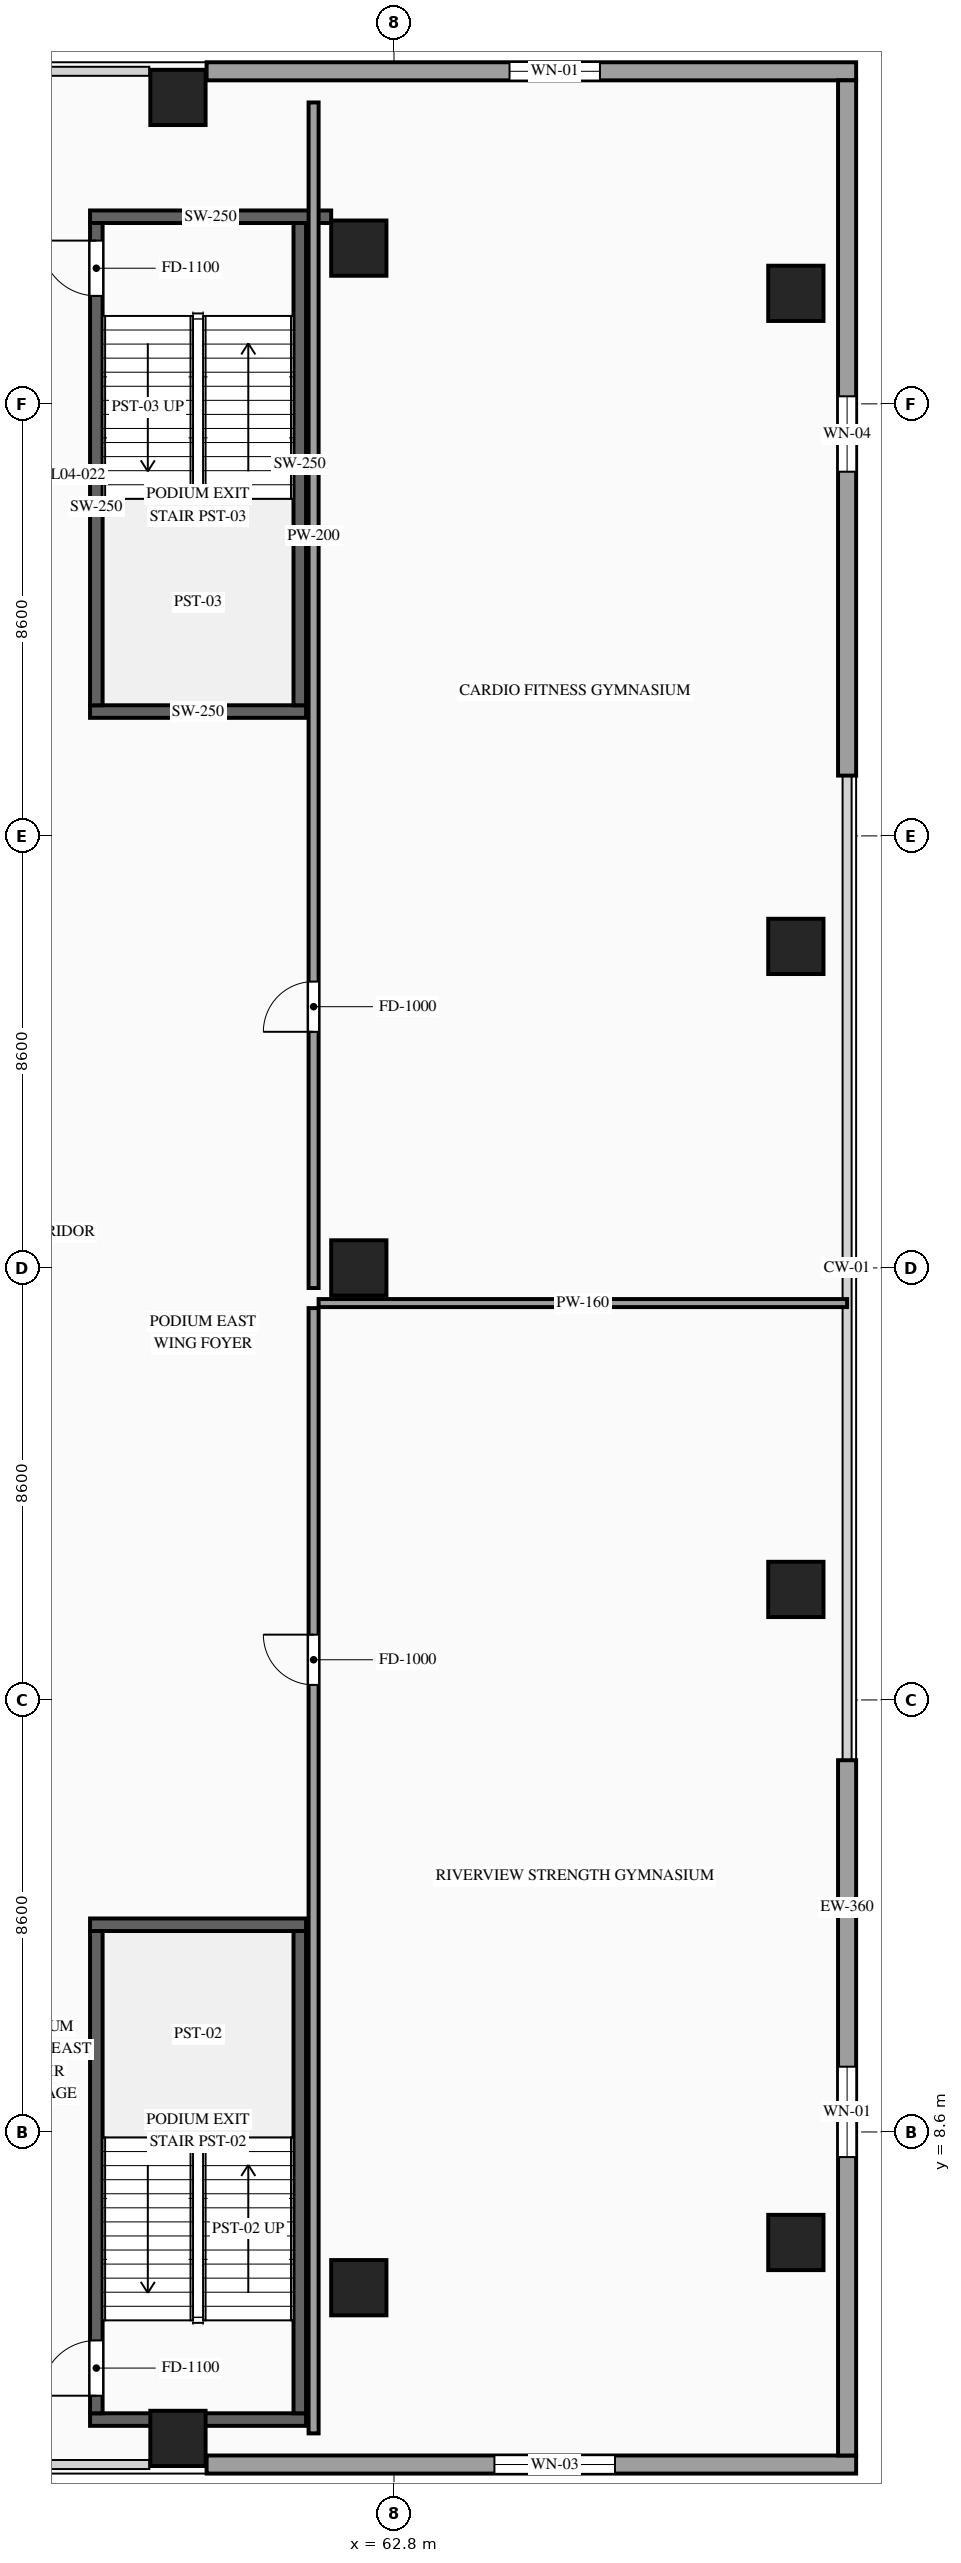
"""IFC4 building model, lengths in metres.
Left out: names, types, materials, properties, quantities, classifications, styles, units other than length and angle.
Written with IfcOpenShell. Run it as: python <this file> out.ifc"""

import sys

from ifc_helpers import new_model, si_unit, direction, frame, frame_2d, origin, origin_2d, place, context, subcontext, project, spatial, rectangle, extrude, source, transform, mapped, element, fill, save


model = new_model("IFC4")
c1 = context("Model", 3, precision=1e-05, world=origin(), true_north=direction((0.0, 1.0)))
c2 = subcontext(c1, "Body", "Model", "MODEL_VIEW")
j1 = project(units=[si_unit("LENGTHUNIT", "METRE"), si_unit("PLANEANGLEUNIT", "RADIAN")], contexts=[c1])
p1 = place(None, origin())
s1 = spatial("IfcSite", under=j1, at=p1, CompositionType="ELEMENT")
p2 = place(p1, origin())
s2 = spatial("IfcBuilding", under=s1, at=p2, CompositionType="ELEMENT")
p3 = place(p2, frame((0.0, 0.0, 15.0)))
s3 = spatial("IfcBuildingStorey", under=s2, at=p3, CompositionType="ELEMENT", Elevation=15.0)
m1 = source(origin(), c2, "Body", "SweptSolid", [
    extrude(rectangle(XDim=1.1, YDim=1.1, at=origin_2d()), origin(), (0.0, 0.0, 1.0), 4.8),
])
for number, where, z_axis, x_axis in (
    (1, (70.8, 6.4, 0.0), (0.0, 0.0, 1.0), (1.0, 0.0, 0.0)),
    (2, (70.8, 19.4, 0.0), (0.0, 0.0, 1.0), (1.0, 0.0, 0.0)),
    (3, (70.8, 32.2, 0.0), (0.0, 0.0, 1.0), (1.0, 0.0, 0.0)),
    (4, (70.8, 45.2, 0.0), (0.0, 0.0, 1.0), (1.0, 0.0, 0.0)),
    (5, (62.1, 5.5, 0.0), (0.0, 0.0, 1.0), (1.0, 0.0, 0.0)),
    (6, (62.1, 25.8, 0.0), (0.0, 0.0, 1.0), (1.0, 0.0, 0.0)),
    (7, (62.1, 46.1, 0.0), (0.0, 0.0, 1.0), (1.0, 0.0, 0.0)),
    (8, (58.5, 2.5, 0.0), (0.0, 0.0, 1.0), (1.0, 0.0, 0.0)),
    (9, (58.5, 49.1, 0.0), (0.0, 0.0, 1.0), (1.0, 0.0, 0.0)),
):
    element("IfcColumn", number, at=place(p3, frame(where, z_axis=z_axis, x_axis=x_axis)), inside=s3, PredefinedType="COLUMN", context=c2, shape_type="MappedRepresentation", body=[
        mapped(m1, transform((0.0, 0.0, 0.0), scale=1.0)),
    ])
p4 = place(p3, frame((59.07, 1.98, 0.0), z_axis=(0.0, 0.0, 1.0), x_axis=(1.0, 0.0, 0.0)))
e10 = element("IfcWall", 10, at=p4, inside=s3, PredefinedType="SOLIDWALL", context=c2, shape_type="SweptSolid", body=[
    extrude(rectangle(XDim=12.93, YDim=0.36, at=frame_2d((6.465, 0.0))), origin(), (0.0, 0.0, 1.0), 4.52),
])
p5 = place(p4, frame((5.73, 0.0, 0.85)))
e11 = element("IfcOpeningElement", 11, at=p5, cuts=e10, PredefinedType="OPENING", context=c2, shape_type="SweptSolid", body=[
    extrude(rectangle(XDim=2.4, YDim=2.4, at=frame_2d((1.2, 1.2))), frame((0.0, 0.195, 0.0), z_axis=(0.0, -1.0, 0.0), x_axis=(1.0, 0.0, 0.0)), (0.0, 0.0, 1.0), 0.39),
])
p6 = place(p3, frame((59.07, 49.62, 0.0), z_axis=(0.0, 0.0, 1.0), x_axis=(1.0, 0.0, 0.0)))
e12 = element("IfcWall", 12, at=p6, inside=s3, PredefinedType="SOLIDWALL", context=c2, shape_type="SweptSolid", body=[
    extrude(rectangle(XDim=12.93, YDim=0.36, at=frame_2d((6.465, 0.0))), origin(), (0.0, 0.0, 1.0), 4.52),
])
p7 = place(p6, frame((6.03, 0.0, 0.9)))
e13 = element("IfcOpeningElement", 13, at=p7, cuts=e12, PredefinedType="OPENING", context=c2, shape_type="SweptSolid", body=[
    extrude(rectangle(XDim=1.8, YDim=2.2, at=frame_2d((0.9, 1.1))), frame((0.0, 0.195, 0.0), z_axis=(0.0, -1.0, 0.0), x_axis=(1.0, 0.0, 0.0)), (0.0, 0.0, 1.0), 0.39),
])
p8 = place(p3, frame((71.82, 2.16, 0.0), z_axis=(0.0, 0.0, 1.0), x_axis=(0.0, 1.0, 0.0)))
e14 = element("IfcWall", 14, at=p8, inside=s3, PredefinedType="SOLIDWALL", context=c2, shape_type="SweptSolid", body=[
    extrude(rectangle(XDim=13.84, YDim=0.36, at=frame_2d((6.92, 0.0))), origin(), (0.0, 0.0, 1.0), 4.52),
])
p9 = place(p8, frame((5.94, 0.0, 0.9)))
e15 = element("IfcOpeningElement", 15, at=p9, cuts=e14, PredefinedType="OPENING", context=c2, shape_type="SweptSolid", body=[
    extrude(rectangle(XDim=1.8, YDim=2.2, at=frame_2d((0.9, 1.1))), frame((0.0, 0.195, 0.0), z_axis=(0.0, -1.0, 0.0), x_axis=(1.0, 0.0, 0.0)), (0.0, 0.0, 1.0), 0.39),
])
p10 = place(p3, frame((71.82, 35.6, 0.0), z_axis=(0.0, 0.0, 1.0), x_axis=(0.0, 1.0, 0.0)))
e16 = element("IfcWall", 16, at=p10, inside=s3, PredefinedType="SOLIDWALL", context=c2, shape_type="SweptSolid", body=[
    extrude(rectangle(XDim=13.84, YDim=0.36, at=frame_2d((6.92, 0.0))), origin(), (0.0, 0.0, 1.0), 4.52),
])
p11 = place(p10, frame((6.05, 0.0, 0.9)))
e17 = element("IfcOpeningElement", 17, at=p11, cuts=e16, PredefinedType="OPENING", context=c2, shape_type="SweptSolid", body=[
    extrude(rectangle(XDim=1.5, YDim=1.8, at=frame_2d((0.75, 0.9))), frame((0.0, 0.195, 0.0), z_axis=(0.0, -1.0, 0.0), x_axis=(1.0, 0.0, 0.0)), (0.0, 0.0, 1.0), 0.39),
])
m2 = source(origin(), c2, "Body", "SweptSolid", [
    extrude(rectangle(XDim=4.3, YDim=0.25, at=frame_2d((2.15, 0.0))), origin(), (0.0, 0.0, 1.0), 4.52),
])
for number, where, z_axis, x_axis in (
    (18, (56.75, 2.875, 0.0), (0.0, 0.0, 1.0), (1.0, 0.0, 0.0)),
    (19, (56.75, 12.725, 0.0), (0.0, 0.0, 1.0), (1.0, 0.0, 0.0)),
):
    element("IfcWall", number, at=place(p3, frame(where, z_axis=z_axis, x_axis=x_axis)), inside=s3, PredefinedType="SOLIDWALL", context=c2, shape_type="MappedRepresentation", body=[
        mapped(m2, transform((0.0, 0.0, 0.0), scale=1.0)),
    ])
p12 = place(p3, frame((56.875, 3.0, 0.0), z_axis=(0.0, 0.0, 1.0), x_axis=(0.0, 1.0, 0.0)))
e20 = element("IfcWall", 20, at=p12, inside=s3, PredefinedType="SOLIDWALL", context=c2, shape_type="SweptSolid", body=[
    extrude(rectangle(XDim=9.6, YDim=0.25, at=frame_2d((4.8, 0.0))), origin(), (0.0, 0.0, 1.0), 4.52),
])
p13 = place(p12, frame((0.35, 0.0, 0.0)))
e21 = element("IfcOpeningElement", 21, at=p13, cuts=e20, PredefinedType="OPENING", context=c2, shape_type="SweptSolid", body=[
    extrude(rectangle(XDim=1.1, YDim=2.2, at=frame_2d((0.55, 1.1))), frame((0.0, 0.14, 0.0), z_axis=(0.0, -1.0, 0.0), x_axis=(1.0, 0.0, 0.0)), (0.0, 0.0, 1.0), 0.28),
])
m3 = source(origin(), c2, "Body", "SweptSolid", [
    extrude(rectangle(XDim=9.6, YDim=0.25, at=frame_2d((4.8, 0.0))), origin(), (0.0, 0.0, 1.0), 4.52),
])
p14 = place(p3, frame((60.925, 3.0, 0.0), z_axis=(0.0, 0.0, 1.0), x_axis=(0.0, 1.0, 0.0)))
e22 = element("IfcWall", 22, at=p14, inside=s3, PredefinedType="SOLIDWALL", context=c2, shape_type="MappedRepresentation", body=[
    mapped(m3, transform((0.0, 0.0, 0.0), scale=1.0)),
])
p15 = place(p3, frame((56.75, 36.875, 0.0), z_axis=(0.0, 0.0, 1.0), x_axis=(1.0, 0.0, 0.0)))
e23 = element("IfcWall", 23, at=p15, inside=s3, PredefinedType="SOLIDWALL", context=c2, shape_type="MappedRepresentation", body=[
    mapped(m2, transform((0.0, 0.0, 0.0), scale=1.0)),
])
m4 = source(origin(), c2, "Body", "SweptSolid", [
    extrude(rectangle(XDim=4.8, YDim=0.25, at=frame_2d((2.4, 0.0))), origin(), (0.0, 0.0, 1.0), 4.52),
])
p16 = place(p3, frame((56.75, 46.725, 0.0), z_axis=(0.0, 0.0, 1.0), x_axis=(1.0, 0.0, 0.0)))
e24 = element("IfcWall", 24, at=p16, inside=s3, PredefinedType="SOLIDWALL", context=c2, shape_type="MappedRepresentation", body=[
    mapped(m4, transform((0.0, 0.0, 0.0), scale=1.0)),
])
p17 = place(p3, frame((56.875, 37.0, 0.0), z_axis=(0.0, 0.0, 1.0), x_axis=(0.0, 1.0, 0.0)))
e25 = element("IfcWall", 25, at=p17, inside=s3, PredefinedType="SOLIDWALL", context=c2, shape_type="SweptSolid", body=[
    extrude(rectangle(XDim=9.6, YDim=0.25, at=frame_2d((4.8, 0.0))), origin(), (0.0, 0.0, 1.0), 4.52),
])
p18 = place(p17, frame((8.15, 0.0, 0.0)))
e26 = element("IfcOpeningElement", 26, at=p18, cuts=e25, PredefinedType="OPENING", context=c2, shape_type="SweptSolid", body=[
    extrude(rectangle(XDim=1.1, YDim=2.2, at=frame_2d((0.55, 1.1))), frame((0.0, 0.14, 0.0), z_axis=(0.0, -1.0, 0.0), x_axis=(1.0, 0.0, 0.0)), (0.0, 0.0, 1.0), 0.28),
])
p19 = place(p3, frame((60.925, 37.0, 0.0), z_axis=(0.0, 0.0, 1.0), x_axis=(0.0, 1.0, 0.0)))
e27 = element("IfcWall", 27, at=p19, inside=s3, PredefinedType="SOLIDWALL", context=c2, shape_type="MappedRepresentation", body=[
    mapped(m3, transform((0.0, 0.0, 0.0), scale=1.0)),
])
p20 = place(p3, frame((61.2, 2.6, 0.0), z_axis=(0.0, 0.0, 1.0), x_axis=(0.0, 1.0, 0.0)))
e28 = element("IfcWall", 28, at=p20, inside=s3, PredefinedType="PARTITIONING", context=c2, shape_type="SweptSolid", body=[
    extrude(rectangle(XDim=22.4, YDim=0.2, at=frame_2d((11.2, 0.0))), origin(), (0.0, 0.0, 1.0), 4.52),
])
p21 = place(p20, frame((14.9, 0.0, 0.0)))
e29 = element("IfcOpeningElement", 29, at=p21, cuts=e28, PredefinedType="OPENING", context=c2, shape_type="SweptSolid", body=[
    extrude(rectangle(XDim=1.0, YDim=2.2, at=frame_2d((0.5, 1.1))), frame((0.0, 0.115, 0.0), z_axis=(0.0, -1.0, 0.0), x_axis=(1.0, 0.0, 0.0)), (0.0, 0.0, 1.0), 0.23),
])
m5 = source(origin(), c2, "Body", "SweptSolid", [
    extrude(rectangle(XDim=10.52, YDim=0.16, at=frame_2d((5.26, 0.0))), origin(), (0.0, 0.0, 1.0), 4.52),
])
p22 = place(p3, frame((61.3, 25.1, 0.0), z_axis=(0.0, 0.0, 1.0), x_axis=(1.0, 0.0, 0.0)))
e30 = element("IfcWall", 30, at=p22, inside=s3, PredefinedType="PARTITIONING", context=c2, shape_type="MappedRepresentation", body=[
    mapped(m5, transform((0.0, 0.0, 0.0), scale=1.0)),
])
p23 = place(p3, frame((61.2, 25.4, 0.0), z_axis=(0.0, 0.0, 1.0), x_axis=(0.0, 1.0, 0.0)))
e31 = element("IfcWall", 31, at=p23, inside=s3, PredefinedType="PARTITIONING", context=c2, shape_type="SweptSolid", body=[
    extrude(rectangle(XDim=23.6, YDim=0.2, at=frame_2d((11.8, 0.0))), origin(), (0.0, 0.0, 1.0), 4.52),
])
p24 = place(p23, frame((5.1, 0.0, 0.0)))
e32 = element("IfcOpeningElement", 32, at=p24, cuts=e31, PredefinedType="OPENING", context=c2, shape_type="SweptSolid", body=[
    extrude(rectangle(XDim=1.0, YDim=2.2, at=frame_2d((0.5, 1.1))), frame((0.0, 0.115, 0.0), z_axis=(0.0, -1.0, 0.0), x_axis=(1.0, 0.0, 0.0)), (0.0, 0.0, 1.0), 0.23),
])
m6 = source(origin(), c2, "Body", "SweptSolid", [
    extrude(rectangle(XDim=2.4, YDim=2.4, at=frame_2d((1.2, 1.2))), frame((0.0, 0.03, 0.0), z_axis=(0.0, -1.0, 0.0), x_axis=(1.0, 0.0, 0.0)), (0.0, 0.0, 1.0), 0.06),
])
p25 = place(p5, origin())
e33 = element("IfcWindow", 33, at=p25, inside=s3, PartitioningType="SINGLE_PANEL", PredefinedType="WINDOW", context=c2, shape_type="MappedRepresentation", body=[
    mapped(m6, transform((0.0, 0.0, 0.0), scale=1.0)),
])
fill(e11, e33)
m7 = source(origin(), c2, "Body", "SweptSolid", [
    extrude(rectangle(XDim=1.8, YDim=2.2, at=frame_2d((0.9, 1.1))), frame((0.0, 0.03, 0.0), z_axis=(0.0, -1.0, 0.0), x_axis=(1.0, 0.0, 0.0)), (0.0, 0.0, 1.0), 0.06),
])
p26 = place(p7, origin())
e34 = element("IfcWindow", 34, at=p26, inside=s3, PartitioningType="SINGLE_PANEL", PredefinedType="WINDOW", context=c2, shape_type="MappedRepresentation", body=[
    mapped(m7, transform((0.0, 0.0, 0.0), scale=1.0)),
])
fill(e13, e34)
p27 = place(p9, origin())
e35 = element("IfcWindow", 35, at=p27, inside=s3, PartitioningType="SINGLE_PANEL", PredefinedType="WINDOW", context=c2, shape_type="MappedRepresentation", body=[
    mapped(m7, transform((0.0, 0.0, 0.0), scale=1.0)),
])
fill(e15, e35)
m8 = source(origin(), c2, "Body", "SweptSolid", [
    extrude(rectangle(XDim=1.5, YDim=1.8, at=frame_2d((0.75, 0.9))), frame((0.0, 0.03, 0.0), z_axis=(0.0, -1.0, 0.0), x_axis=(1.0, 0.0, 0.0)), (0.0, 0.0, 1.0), 0.06),
])
p28 = place(p11, origin())
e36 = element("IfcWindow", 36, at=p28, inside=s3, PartitioningType="SINGLE_PANEL", PredefinedType="WINDOW", context=c2, shape_type="MappedRepresentation", body=[
    mapped(m8, transform((0.0, 0.0, 0.0), scale=1.0)),
])
fill(e17, e36)
m9 = source(origin(), c2, "Body", "SweptSolid", [
    extrude(rectangle(XDim=1.1, YDim=2.2, at=frame_2d((0.55, 1.1))), frame((0.0, 0.025, 0.0), z_axis=(0.0, -1.0, 0.0), x_axis=(1.0, 0.0, 0.0)), (0.0, 0.0, 1.0), 0.05),
])
p29 = place(p13, origin())
e37 = element("IfcDoor", 37, at=p29, inside=s3, OperationType="SINGLE_SWING_LEFT", PredefinedType="DOOR", context=c2, shape_type="MappedRepresentation", body=[
    mapped(m9, transform((0.0, 0.0, 0.0), scale=1.0)),
])
fill(e21, e37)
p30 = place(p18, origin())
e38 = element("IfcDoor", 38, at=p30, inside=s3, OperationType="SINGLE_SWING_RIGHT", PredefinedType="DOOR", context=c2, shape_type="MappedRepresentation", body=[
    mapped(m9, transform((0.0, 0.0, 0.0), scale=1.0)),
])
fill(e26, e38)
m10 = source(origin(), c2, "Body", "SweptSolid", [
    extrude(rectangle(XDim=1.0, YDim=2.2, at=frame_2d((0.5, 1.1))), frame((0.0, 0.025, 0.0), z_axis=(0.0, -1.0, 0.0), x_axis=(1.0, 0.0, 0.0)), (0.0, 0.0, 1.0), 0.05),
])
p31 = place(p21, origin())
e39 = element("IfcDoor", 39, at=p31, inside=s3, OperationType="SINGLE_SWING_RIGHT", PredefinedType="DOOR", context=c2, shape_type="MappedRepresentation", body=[
    mapped(m10, transform((0.0, 0.0, 0.0), scale=1.0)),
])
fill(e29, e39)
p32 = place(p24, origin())
e40 = element("IfcDoor", 40, at=p32, inside=s3, OperationType="SINGLE_SWING_LEFT", PredefinedType="DOOR", context=c2, shape_type="MappedRepresentation", body=[
    mapped(m10, transform((0.0, 0.0, 0.0), scale=1.0)),
])
fill(e32, e40)
save(model, sys.argv[1])
